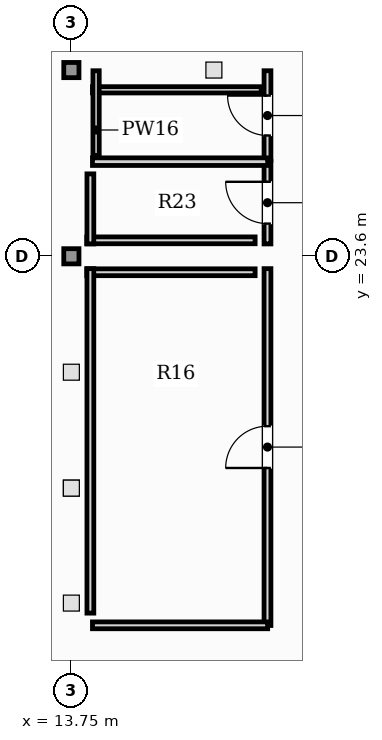
"""IFC4 building model, lengths in metres.
Left out: names, types, materials, properties, quantities, classifications, styles, units other than length and angle.
Written with IfcOpenShell. Run it as: python <this file> out.ifc"""

import sys

from ifc_helpers import new_model, si_unit, direction, frame, frame_2d, origin, origin_2d, place, context, subcontext, project, spatial, rectangle, hollow_rectangle, extrude, element, fill, save


model = new_model("IFC4")
c1 = context("Model", 3, precision=1e-05, world=origin(), true_north=direction((0.0, 1.0)))
c2 = subcontext(c1, "Body", "Model", "MODEL_VIEW")
j1 = project(units=[si_unit("LENGTHUNIT", "METRE"), si_unit("PLANEANGLEUNIT", "RADIAN")], contexts=[c1])
p1 = place(None, origin())
s1 = spatial("IfcSite", under=j1, at=p1, CompositionType="ELEMENT")
p2 = place(p1, origin())
s2 = spatial("IfcBuilding", under=s1, at=p2, CompositionType="ELEMENT")
p3 = place(p2, frame((0.0, 0.0, 332.3)))
s3 = spatial("IfcBuildingStorey", under=s2, at=p3, CompositionType="ELEMENT", Elevation=332.3)
for number, where, z_axis, x_axis in (
    (1, (13.75, 23.6, 0.0), (0.0, 0.0, 1.0), (1.0, 0.0, 0.0)),
    (2, (13.75, 28.5, 0.0), (0.0, 0.0, 1.0), (1.0, 0.0, 0.0)),
):
    element("IfcColumn", number, at=place(p3, frame(where, z_axis=z_axis, x_axis=x_axis)), inside=s3, PredefinedType="COLUMN", context=c2, shape_type="SweptSolid", body=[
        extrude(hollow_rectangle(XDim=0.4, YDim=0.4, WallThickness=0.02, at=origin_2d()), origin(), (0.0, 0.0, 1.0), 5.2),
    ])
p4 = place(p3, frame((18.91, 13.885, 0.0), z_axis=(0.0, 0.0, 1.0), x_axis=(0.0, 1.0, 0.0)))
e3 = element("IfcWall", 3, at=p4, inside=s3, PredefinedType="PARTITIONING", context=c2, shape_type="SweptSolid", body=[
    extrude(rectangle(XDim=9.39, YDim=0.18, at=frame_2d((4.695, 0.0))), origin(), (0.0, 0.0, 1.0), 4.98),
])
p5 = place(p4, frame((4.145, 0.0, 0.0)))
e4 = element("IfcOpeningElement", 4, at=p5, cuts=e3, PredefinedType="OPENING", context=c2, shape_type="SweptSolid", body=[
    extrude(rectangle(XDim=1.1, YDim=2.2, at=frame_2d((0.55, 1.1))), frame((0.0, 0.1, 0.0), z_axis=(0.0, -1.0, 0.0), x_axis=(1.0, 0.0, 0.0)), (0.0, 0.0, 1.0), 0.2),
])
p6 = place(p3, frame((14.305, 13.89, 0.0), z_axis=(0.0, 0.0, 1.0), x_axis=(1.0, 0.0, 0.0)))
e5 = element("IfcWall", 5, at=p6, inside=s3, PredefinedType="PARTITIONING", context=c2, shape_type="SweptSolid", body=[
    extrude(rectangle(XDim=4.61, YDim=0.18, at=frame_2d((2.305, 0.0))), origin(), (0.0, 0.0, 1.0), 4.98),
])
p7 = place(p3, frame((18.91, 23.925, 0.0), z_axis=(0.0, 0.0, 1.0), x_axis=(0.0, 1.0, 0.0)))
e6 = element("IfcWall", 6, at=p7, inside=s3, PredefinedType="PARTITIONING", context=c2, shape_type="SweptSolid", body=[
    extrude(rectangle(XDim=2.17, YDim=0.18, at=frame_2d((1.085, 0.0))), origin(), (0.0, 0.0, 1.0), 4.98),
])
p8 = place(p7, frame((0.535, 0.0, 0.0)))
e7 = element("IfcOpeningElement", 7, at=p8, cuts=e6, PredefinedType="OPENING", context=c2, shape_type="SweptSolid", body=[
    extrude(rectangle(XDim=1.1, YDim=2.2, at=frame_2d((0.55, 1.1))), frame((0.0, 0.1, 0.0), z_axis=(0.0, -1.0, 0.0), x_axis=(1.0, 0.0, 0.0)), (0.0, 0.0, 1.0), 0.2),
])
p9 = place(p3, frame((18.91, 26.125, 0.0), z_axis=(0.0, 0.0, 1.0), x_axis=(0.0, 1.0, 0.0)))
e8 = element("IfcWall", 8, at=p9, inside=s3, PredefinedType="PARTITIONING", context=c2, shape_type="SweptSolid", body=[
    extrude(rectangle(XDim=2.357, YDim=0.18, at=frame_2d((1.178, 0.0))), origin(), (0.0, 0.0, 1.0), 4.98),
])
p10 = place(p9, frame((0.654, 0.0, 0.0)))
e9 = element("IfcOpeningElement", 9, at=p10, cuts=e8, PredefinedType="OPENING", context=c2, shape_type="SweptSolid", body=[
    extrude(rectangle(XDim=1.05, YDim=2.15, at=frame_2d((0.525, 1.075))), frame((0.0, 0.1, 0.0), z_axis=(0.0, -1.0, 0.0), x_axis=(1.0, 0.0, 0.0)), (0.0, 0.0, 1.0), 0.2),
])
p11 = place(p3, frame((14.305, 26.09, 0.0), z_axis=(0.0, 0.0, 1.0), x_axis=(1.0, 0.0, 0.0)))
e10 = element("IfcWall", 10, at=p11, inside=s3, PredefinedType="PARTITIONING", context=c2, shape_type="SweptSolid", body=[
    extrude(rectangle(XDim=4.61, YDim=0.2, at=frame_2d((2.305, 0.0))), origin(), (0.0, 0.0, 1.0), 4.98),
])
p12 = place(p3, frame((18.585, 23.18, 0.0), z_axis=(0.0, 0.0, 1.0), x_axis=(-1.0, 0.0, 0.0)))
e11 = element("IfcWall", 11, at=p12, inside=s3, PredefinedType="PARTITIONING", context=c2, shape_type="SweptSolid", body=[
    extrude(rectangle(XDim=4.43, YDim=0.18, at=frame_2d((2.215, 0.0))), origin(), (0.0, 0.0, 1.0), 4.98),
])
p13 = place(p3, frame((14.25, 23.275, 0.0), z_axis=(0.0, 0.0, 1.0), x_axis=(0.0, -1.0, 0.0)))
e12 = element("IfcWall", 12, at=p13, inside=s3, PredefinedType="PARTITIONING", context=c2, shape_type="SweptSolid", body=[
    extrude(rectangle(XDim=9.064, YDim=0.18, at=frame_2d((4.532, 0.0))), origin(), (0.0, 0.0, 1.0), 4.98),
])
p14 = place(p3, frame((14.155, 24.02, 0.0), z_axis=(0.0, 0.0, 1.0), x_axis=(1.0, 0.0, 0.0)))
e13 = element("IfcWall", 13, at=p14, inside=s3, PredefinedType="PARTITIONING", context=c2, shape_type="SweptSolid", body=[
    extrude(rectangle(XDim=4.43, YDim=0.18, at=frame_2d((2.215, 0.0))), origin(), (0.0, 0.0, 1.0), 4.98),
])
p15 = place(p3, frame((14.25, 25.769, 0.0), z_axis=(0.0, 0.0, 1.0), x_axis=(0.0, -1.0, 0.0)))
e14 = element("IfcWall", 14, at=p15, inside=s3, PredefinedType="PARTITIONING", context=c2, shape_type="SweptSolid", body=[
    extrude(rectangle(XDim=1.844, YDim=0.18, at=frame_2d((0.922, 0.0))), origin(), (0.0, 0.0, 1.0), 4.98),
])
p16 = place(p3, frame((18.745, 27.98, 0.0), z_axis=(0.0, 0.0, 1.0), x_axis=(-1.0, 0.0, 0.0)))
e15 = element("IfcWall", 15, at=p16, inside=s3, PredefinedType="PLUMBINGWALL", context=c2, shape_type="SweptSolid", body=[
    extrude(rectangle(XDim=4.44, YDim=0.165, at=frame_2d((2.22, 0.0))), origin(), (0.0, 0.0, 1.0), 4.98),
])
p17 = place(p3, frame((14.4, 28.482, 0.0), z_axis=(0.0, 0.0, 1.0), x_axis=(0.0, -1.0, 0.0)))
e16 = element("IfcWall", 16, at=p17, inside=s3, PredefinedType="PLUMBINGWALL", context=c2, shape_type="SweptSolid", body=[
    extrude(rectangle(XDim=2.227, YDim=0.165, at=frame_2d((1.114, 0.0))), origin(), (0.0, 0.0, 1.0), 4.98),
])
p18 = place(p5, origin())
e17 = element("IfcDoor", 17, at=p18, inside=s3, OperationType="SINGLE_SWING_LEFT", PredefinedType="DOOR", context=c2, shape_type="SweptSolid", body=[
    extrude(rectangle(XDim=1.1, YDim=2.2, at=frame_2d((0.55, 1.1))), frame((0.0, 0.025, 0.0), z_axis=(0.0, -1.0, 0.0), x_axis=(1.0, 0.0, 0.0)), (0.0, 0.0, 1.0), 0.05),
])
fill(e4, e17)
p19 = place(p8, origin())
e18 = element("IfcDoor", 18, at=p19, inside=s3, OperationType="SINGLE_SWING_RIGHT", PredefinedType="DOOR", context=c2, shape_type="SweptSolid", body=[
    extrude(rectangle(XDim=1.1, YDim=2.2, at=frame_2d((0.55, 1.1))), frame((0.0, 0.025, 0.0), z_axis=(0.0, -1.0, 0.0), x_axis=(1.0, 0.0, 0.0)), (0.0, 0.0, 1.0), 0.05),
])
fill(e7, e18)
p20 = place(p10, origin())
e19 = element("IfcDoor", 19, at=p20, inside=s3, OperationType="SINGLE_SWING_RIGHT", PredefinedType="DOOR", context=c2, shape_type="SweptSolid", body=[
    extrude(rectangle(XDim=1.05, YDim=2.15, at=frame_2d((0.525, 1.075))), frame((0.0, 0.025, 0.0), z_axis=(0.0, -1.0, 0.0), x_axis=(1.0, 0.0, 0.0)), (0.0, 0.0, 1.0), 0.05),
])
fill(e9, e19)
save(model, sys.argv[1])
